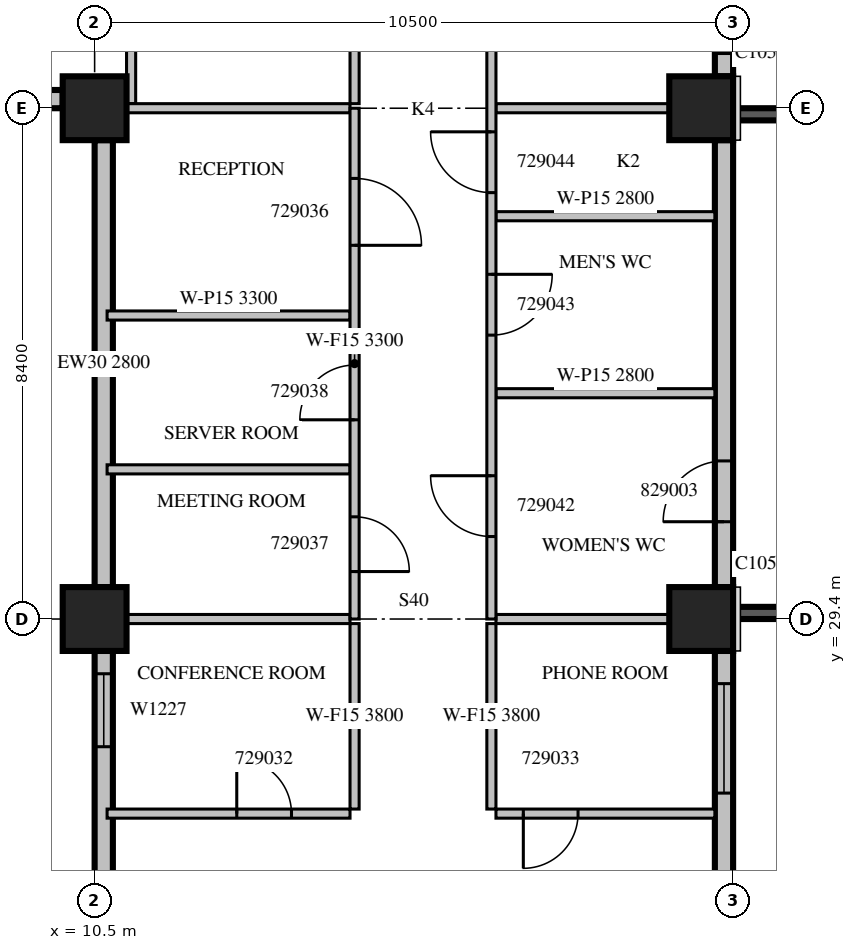
"""IFC4 building model, lengths in metres.
Left out: names, types, materials, properties, quantities, classifications, styles, units other than length and angle.
Written with IfcOpenShell. Run it as: python <this file> out.ifc"""

import sys

from ifc_helpers import new_model, si_unit, direction, frame, frame_2d, origin, origin_2d, place, context, subcontext, project, spatial, rectangle, extrude, source, transform, mapped, element, fill, save


model = new_model("IFC4")
c1 = context("Model", 3, precision=1e-05, world=origin(), true_north=direction((0.0, 1.0)))
c2 = subcontext(c1, "Body", "Model", "MODEL_VIEW")
j1 = project(units=[si_unit("LENGTHUNIT", "METRE"), si_unit("PLANEANGLEUNIT", "RADIAN")], contexts=[c1])
p1 = place(None, origin())
s1 = spatial("IfcSite", under=j1, at=p1, CompositionType="ELEMENT")
p2 = place(p1, origin())
s2 = spatial("IfcBuilding", under=s1, at=p2, CompositionType="ELEMENT")
p3 = place(p2, frame((0.0, 0.0, 132.9)))
s3 = spatial("IfcBuildingStorey", under=s2, at=p3, CompositionType="ELEMENT", Elevation=132.9)
m1 = source(origin(), c2, "Body", "SweptSolid", [
    extrude(rectangle(XDim=1.05, YDim=1.05, at=origin_2d()), origin(), (0.0, 0.0, 1.0), 4.2),
])
for number, where, z_axis, x_axis in (
    (1, (10.5, 29.4, 0.0), (0.0, 0.0, 1.0), (1.0, 0.0, 0.0)),
    (2, (20.475, 29.4, 0.0), (0.0, 0.0, 1.0), (1.0, 0.0, 0.0)),
    (3, (10.5, 37.8, 0.0), (0.0, 0.0, 1.0), (1.0, 0.0, 0.0)),
    (4, (20.475, 37.8, 0.0), (0.0, 0.0, 1.0), (1.0, 0.0, 0.0)),
):
    element("IfcColumn", number, at=place(p3, frame(where, z_axis=z_axis, x_axis=x_axis)), inside=s3, PredefinedType="COLUMN", context=c2, shape_type="MappedRepresentation", body=[
        mapped(m1, transform((0.0, 0.0, 0.0), scale=1.0)),
    ])
m2 = source(origin(), c2, "Body", "SweptSolid", [
    extrude(rectangle(XDim=6.875, YDim=0.3, at=frame_2d((3.438, 0.0))), origin(), (0.0, 0.0, 1.0), 3.8),
])
p4 = place(p3, frame((20.85, 22.0, 0.0), z_axis=(0.0, 0.0, 1.0), x_axis=(0.0, 1.0, 0.0)))
e5 = element("IfcWall", 5, at=p4, inside=s3, PredefinedType="STANDARD", context=c2, shape_type="MappedRepresentation", body=[
    mapped(m2, transform((0.0, 0.0, 0.0), scale=1.0)),
])
m3 = source(origin(), c2, "Body", "SweptSolid", [
    extrude(rectangle(XDim=1.8, YDim=2.7, at=frame_2d((0.9, 1.35))), frame((0.0, 0.16, 0.0), z_axis=(0.0, -1.0, 0.0), x_axis=(1.0, 0.0, 0.0)), (0.0, 0.0, 1.0), 0.32),
])
p5 = place(p4, frame((0.2, 0.0, 0.6)))
e6 = element("IfcOpeningElement", 6, at=p5, cuts=e5, PredefinedType="OPENING", context=c2, shape_type="MappedRepresentation", body=[
    mapped(m3, transform((0.0, 0.0, 0.0), scale=1.0)),
])
p6 = place(p4, frame((4.537, 0.0, 0.6)))
e7 = element("IfcOpeningElement", 7, at=p6, cuts=e5, PredefinedType="OPENING", context=c2, shape_type="MappedRepresentation", body=[
    mapped(m3, transform((0.0, 0.0, 0.0), scale=1.0)),
])
m4 = source(origin(), c2, "Body", "SweptSolid", [
    extrude(rectangle(XDim=7.35, YDim=0.3, at=frame_2d((3.675, 0.0))), origin(), (0.0, 0.0, 1.0), 3.8),
])
p7 = place(p3, frame((20.85, 29.925, 0.0), z_axis=(0.0, 0.0, 1.0), x_axis=(0.0, 1.0, 0.0)))
e8 = element("IfcWall", 8, at=p7, inside=s3, PredefinedType="STANDARD", context=c2, shape_type="MappedRepresentation", body=[
    mapped(m4, transform((0.0, 0.0, 0.0), scale=1.0)),
])
m5 = source(origin(), c2, "Body", "SweptSolid", [
    extrude(rectangle(XDim=1.0, YDim=2.1, at=frame_2d((0.5, 1.05))), frame((0.0, 0.16, 0.0), z_axis=(0.0, -1.0, 0.0), x_axis=(1.0, 0.0, 0.0)), (0.0, 0.0, 1.0), 0.32),
])
p8 = place(p7, frame((1.075, 0.0, 0.0)))
e9 = element("IfcOpeningElement", 9, at=p8, cuts=e8, PredefinedType="OPENING", context=c2, shape_type="MappedRepresentation", body=[
    mapped(m5, transform((0.0, 0.0, 0.0), scale=1.0)),
])
p9 = place(p3, frame((20.85, 38.325, 0.0), z_axis=(0.0, 0.0, 1.0), x_axis=(0.0, 1.0, 0.0)))
e10 = element("IfcWall", 10, at=p9, inside=s3, PredefinedType="STANDARD", context=c2, shape_type="MappedRepresentation", body=[
    mapped(m4, transform((0.0, 0.0, 0.0), scale=1.0)),
])
m6 = source(origin(), c2, "Body", "SweptSolid", [
    extrude(rectangle(XDim=2.4, YDim=2.7, at=frame_2d((1.2, 1.35))), frame((0.0, 0.16, 0.0), z_axis=(0.0, -1.0, 0.0), x_axis=(1.0, 0.0, 0.0)), (0.0, 0.0, 1.0), 0.32),
])
p10 = place(p9, frame((0.375, 0.0, 0.6)))
e11 = element("IfcOpeningElement", 11, at=p10, cuts=e10, PredefinedType="OPENING", context=c2, shape_type="MappedRepresentation", body=[
    mapped(m6, transform((0.0, 0.0, 0.0), scale=1.0)),
])
p11 = place(p9, frame((4.575, 0.0, 0.6)))
e12 = element("IfcOpeningElement", 12, at=p11, cuts=e10, PredefinedType="OPENING", context=c2, shape_type="MappedRepresentation", body=[
    mapped(m6, transform((0.0, 0.0, 0.0), scale=1.0)),
])
m7 = source(origin(), c2, "Body", "SweptSolid", [
    extrude(rectangle(XDim=1.275, YDim=0.3, at=frame_2d((0.637, 0.0))), origin(), (0.0, 0.0, 1.0), 3.8),
])
p12 = place(p3, frame((8.7, 37.95, 0.0), z_axis=(0.0, 0.0, 1.0), x_axis=(1.0, 0.0, 0.0)))
e13 = element("IfcWall", 13, at=p12, inside=s3, PredefinedType="STANDARD", context=c2, shape_type="MappedRepresentation", body=[
    mapped(m7, transform((0.0, 0.0, 0.0), scale=1.0)),
])
m8 = source(origin(), c2, "Body", "SweptSolid", [
    extrude(rectangle(XDim=7.35, YDim=0.3, at=frame_2d((3.675, 0.0))), origin(), (0.0, 0.0, 1.0), 2.8),
])
p13 = place(p3, frame((10.65, 37.275, 0.0), z_axis=(0.0, 0.0, 1.0), x_axis=(0.0, -1.0, 0.0)))
e14 = element("IfcWall", 14, at=p13, inside=s3, PredefinedType="STANDARD", context=c2, shape_type="MappedRepresentation", body=[
    mapped(m8, transform((0.0, 0.0, 0.0), scale=1.0)),
])
p14 = place(p3, frame((10.65, 28.875, 0.0), z_axis=(0.0, 0.0, 1.0), x_axis=(0.0, -1.0, 0.0)))
e15 = element("IfcWall", 15, at=p14, inside=s3, PredefinedType="STANDARD", context=c2, shape_type="MappedRepresentation", body=[
    mapped(m2, transform((0.0, 0.0, 0.0), scale=1.0)),
])
m9 = source(origin(), c2, "Body", "SweptSolid", [
    extrude(rectangle(XDim=1.2, YDim=2.7, at=frame_2d((0.6, 1.35))), frame((0.0, 0.16, 0.0), z_axis=(0.0, -1.0, 0.0), x_axis=(1.0, 0.0, 0.0)), (0.0, 0.0, 1.0), 0.32),
])
p15 = place(p14, frame((0.375, 0.0, 0.6)))
e16 = element("IfcOpeningElement", 16, at=p15, cuts=e15, PredefinedType="OPENING", context=c2, shape_type="MappedRepresentation", body=[
    mapped(m9, transform((0.0, 0.0, 0.0), scale=1.0)),
])
m10 = source(origin(), c2, "Body", "SweptSolid", [
    extrude(rectangle(XDim=3.0, YDim=2.7, at=frame_2d((1.5, 1.35))), frame((0.0, 0.16, 0.0), z_axis=(0.0, -1.0, 0.0), x_axis=(1.0, 0.0, 0.0)), (0.0, 0.0, 1.0), 0.32),
])
p16 = place(p14, frame((3.675, 0.0, 0.6)))
e17 = element("IfcOpeningElement", 17, at=p16, cuts=e15, PredefinedType="OPENING", context=c2, shape_type="MappedRepresentation", body=[
    mapped(m10, transform((0.0, 0.0, 0.0), scale=1.0)),
])
m11 = source(origin(), c2, "Body", "SweptSolid", [
    extrude(rectangle(XDim=3.9, YDim=0.2, at=frame_2d((1.95, 0.0))), origin(), (0.0, 0.0, 1.0), 3.79),
])
p17 = place(p3, frame((21.0, 29.5, 0.0), z_axis=(0.0, 0.0, 1.0), x_axis=(1.0, 0.0, 0.0)))
e18 = element("IfcWall", 18, at=p17, inside=s3, PredefinedType="SOLIDWALL", context=c2, shape_type="MappedRepresentation", body=[
    mapped(m11, transform((0.0, 0.0, 0.0), scale=1.0)),
])
m12 = source(origin(), c2, "Body", "SweptSolid", [
    extrude(rectangle(XDim=2.4, YDim=2.7, at=frame_2d((1.2, 1.35))), frame((0.0, 0.11, 0.0), z_axis=(0.0, -1.0, 0.0), x_axis=(1.0, 0.0, 0.0)), (0.0, 0.0, 1.0), 0.22),
])
p18 = place(p17, frame((0.75, 0.0, 0.6)))
e19 = element("IfcOpeningElement", 19, at=p18, cuts=e18, PredefinedType="OPENING", context=c2, shape_type="MappedRepresentation", body=[
    mapped(m12, transform((0.0, 0.0, 0.0), scale=1.0)),
])
p19 = place(p3, frame((21.0, 37.7, 0.0), z_axis=(0.0, 0.0, 1.0), x_axis=(1.0, 0.0, 0.0)))
e20 = element("IfcWall", 20, at=p19, inside=s3, PredefinedType="SOLIDWALL", context=c2, shape_type="MappedRepresentation", body=[
    mapped(m11, transform((0.0, 0.0, 0.0), scale=1.0)),
])
p20 = place(p19, frame((0.75, 0.0, 0.6)))
e21 = element("IfcOpeningElement", 21, at=p20, cuts=e20, PredefinedType="OPENING", context=c2, shape_type="MappedRepresentation", body=[
    mapped(m12, transform((0.0, 0.0, 0.0), scale=1.0)),
])
m13 = source(origin(), c2, "Body", "SweptSolid", [
    extrude(rectangle(XDim=3.995, YDim=0.15, at=frame_2d((1.998, 0.0))), origin(), (0.0, 0.0, 1.0), 3.8),
])
p21 = place(p3, frame((10.705, 26.2, 0.0), z_axis=(0.0, 0.0, 1.0), x_axis=(1.0, 0.0, 0.0)))
e22 = element("IfcWall", 22, at=p21, inside=s3, PredefinedType="PARTITIONING", context=c2, shape_type="MappedRepresentation", body=[
    mapped(m13, transform((0.0, 0.0, 0.0), scale=1.0)),
])
m14 = source(origin(), c2, "Body", "SweptSolid", [
    extrude(rectangle(XDim=0.9, YDim=2.1, at=frame_2d((0.45, 1.05))), frame((0.0, 0.085, 0.0), z_axis=(0.0, -1.0, 0.0), x_axis=(1.0, 0.0, 0.0)), (0.0, 0.0, 1.0), 0.17),
])
p22 = place(p21, frame((2.132, 0.0, 0.0)))
e23 = element("IfcOpeningElement", 23, at=p22, cuts=e22, PredefinedType="OPENING", context=c2, shape_type="MappedRepresentation", body=[
    mapped(m14, transform((0.0, 0.0, 0.0), scale=1.0)),
])
m15 = source(origin(), c2, "Body", "SweptSolid", [
    extrude(rectangle(XDim=3.6, YDim=0.15, at=frame_2d((1.8, 0.0))), origin(), (0.0, 0.0, 1.0), 3.8),
])
p23 = place(p3, frame((17.1, 26.2, 0.0), z_axis=(0.0, 0.0, 1.0), x_axis=(1.0, 0.0, 0.0)))
e24 = element("IfcWall", 24, at=p23, inside=s3, PredefinedType="PARTITIONING", context=c2, shape_type="MappedRepresentation", body=[
    mapped(m15, transform((0.0, 0.0, 0.0), scale=1.0)),
])
p24 = place(p23, frame((0.45, 0.0, 0.0)))
e25 = element("IfcOpeningElement", 25, at=p24, cuts=e24, PredefinedType="OPENING", context=c2, shape_type="MappedRepresentation", body=[
    mapped(m14, transform((0.0, 0.0, 0.0), scale=1.0)),
])
m16 = source(origin(), c2, "Body", "SweptSolid", [
    extrude(rectangle(XDim=3.05, YDim=0.15, at=frame_2d((1.525, 0.0))), origin(), (0.0, 0.0, 1.0), 3.8),
])
for number, where, z_axis, x_axis in (
    (26, (14.775, 26.275, 0.0), (0.0, 0.0, 1.0), (0.0, 1.0, 0.0)),
    (27, (17.025, 29.325, 0.0), (0.0, 0.0, 1.0), (0.0, -1.0, 0.0)),
):
    element("IfcWall", number, at=place(p3, frame(where, z_axis=z_axis, x_axis=x_axis)), inside=s3, PredefinedType="PARTITIONING", context=c2, shape_type="MappedRepresentation", body=[
        mapped(m16, transform((0.0, 0.0, 0.0), scale=1.0)),
    ])
m17 = source(origin(), c2, "Body", "SweptSolid", [
    extrude(rectangle(XDim=3.676, YDim=0.15, at=frame_2d((1.838, 0.0))), origin(), (0.0, 0.0, 1.0), 3.8),
])
p25 = place(p3, frame((14.7, 29.4, 0.0), z_axis=(0.0, 0.0, 1.0), x_axis=(-1.0, 0.0, 0.0)))
e28 = element("IfcWall", 28, at=p25, inside=s3, PredefinedType="PARTITIONING", context=c2, shape_type="MappedRepresentation", body=[
    mapped(m17, transform((0.0, 0.0, 0.0), scale=1.0)),
])
m18 = source(origin(), c2, "Body", "SweptSolid", [
    extrude(rectangle(XDim=2.851, YDim=0.15, at=frame_2d((1.425, 0.0))), origin(), (0.0, 0.0, 1.0), 3.8),
])
p26 = place(p3, frame((19.951, 29.4, 0.0), z_axis=(0.0, 0.0, 1.0), x_axis=(-1.0, 0.0, 0.0)))
e29 = element("IfcWall", 29, at=p26, inside=s3, PredefinedType="PARTITIONING", context=c2, shape_type="MappedRepresentation", body=[
    mapped(m18, transform((0.0, 0.0, 0.0), scale=1.0)),
])
m19 = source(origin(), c2, "Body", "SweptSolid", [
    extrude(rectangle(XDim=6.45, YDim=0.15, at=frame_2d((3.225, 0.0))), origin(), (0.0, 0.0, 1.0), 3.8),
])
p27 = place(p3, frame((11.1, 44.325, 0.0), z_axis=(0.0, 0.0, 1.0), x_axis=(0.0, -1.0, 0.0)))
e30 = element("IfcWall", 30, at=p27, inside=s3, PredefinedType="PARTITIONING", context=c2, shape_type="MappedRepresentation", body=[
    mapped(m19, transform((0.0, 0.0, 0.0), scale=1.0)),
])
p28 = place(p3, frame((14.775, 37.875, 0.0), z_axis=(0.0, 0.0, 1.0), x_axis=(0.0, 1.0, 0.0)))
e31 = element("IfcWall", 31, at=p28, inside=s3, PredefinedType="PARTITIONING", context=c2, shape_type="MappedRepresentation", body=[
    mapped(m19, transform((0.0, 0.0, 0.0), scale=1.0)),
])
p29 = place(p28, frame((2.737, 0.0, 0.0)))
e32 = element("IfcOpeningElement", 32, at=p29, cuts=e31, PredefinedType="OPENING", context=c2, shape_type="MappedRepresentation", body=[
    mapped(m14, transform((0.0, 0.0, 0.0), scale=1.0)),
])
p30 = place(p3, frame((14.7, 31.861, 0.0), z_axis=(0.0, 0.0, 1.0), x_axis=(-1.0, 0.0, 0.0)))
e33 = element("IfcWall", 33, at=p30, inside=s3, PredefinedType="PARTITIONING", context=c2, shape_type="MappedRepresentation", body=[
    mapped(m13, transform((0.0, 0.0, 0.0), scale=1.0)),
])
p31 = place(p3, frame((14.7, 34.391, 0.0), z_axis=(0.0, 0.0, 1.0), x_axis=(-1.0, 0.0, 0.0)))
e34 = element("IfcWall", 34, at=p31, inside=s3, PredefinedType="PARTITIONING", context=c2, shape_type="SweptSolid", body=[
    extrude(rectangle(XDim=3.995, YDim=0.15, at=frame_2d((1.998, 0.0))), origin(), (0.0, 0.0, 1.0), 3.3),
])
p32 = place(p3, frame((14.7, 37.8, 0.0), z_axis=(0.0, 0.0, 1.0), x_axis=(-1.0, 0.0, 0.0)))
e35 = element("IfcWall", 35, at=p32, inside=s3, PredefinedType="PARTITIONING", context=c2, shape_type="MappedRepresentation", body=[
    mapped(m17, transform((0.0, 0.0, 0.0), scale=1.0)),
])
m20 = source(origin(), c2, "Body", "SweptSolid", [
    extrude(rectangle(XDim=3.6, YDim=0.15, at=frame_2d((1.8, 0.0))), origin(), (0.0, 0.0, 1.0), 2.8),
])
for number, where, z_axis, x_axis in (
    (36, (17.1, 33.113, 0.0), (0.0, 0.0, 1.0), (1.0, 0.0, 0.0)),
    (37, (17.1, 36.024, 0.0), (0.0, 0.0, 1.0), (1.0, 0.0, 0.0)),
):
    element("IfcWall", number, at=place(p3, frame(where, z_axis=z_axis, x_axis=x_axis)), inside=s3, PredefinedType="PARTITIONING", context=c2, shape_type="MappedRepresentation", body=[
        mapped(m20, transform((0.0, 0.0, 0.0), scale=1.0)),
    ])
p33 = place(p3, frame((19.951, 37.8, 0.0), z_axis=(0.0, 0.0, 1.0), x_axis=(-1.0, 0.0, 0.0)))
e38 = element("IfcWall", 38, at=p33, inside=s3, PredefinedType="PARTITIONING", context=c2, shape_type="MappedRepresentation", body=[
    mapped(m18, transform((0.0, 0.0, 0.0), scale=1.0)),
])
m21 = source(origin(), c2, "Body", "SweptSolid", [
    extrude(rectangle(XDim=8.4, YDim=0.15, at=frame_2d((4.2, 0.0))), origin(), (0.0, 0.0, 1.0), 3.3),
])
p34 = place(p3, frame((14.775, 29.4, 0.0), z_axis=(0.0, 0.0, 1.0), x_axis=(0.0, 1.0, 0.0)))
e39 = element("IfcWall", 39, at=p34, inside=s3, PredefinedType="PARTITIONING", context=c2, shape_type="MappedRepresentation", body=[
    mapped(m21, transform((0.0, 0.0, 0.0), scale=1.0)),
])
m22 = source(origin(), c2, "Body", "SweptSolid", [
    extrude(rectangle(XDim=1.1, YDim=2.1, at=frame_2d((0.55, 1.05))), frame((0.0, 0.085, 0.0), z_axis=(0.0, -1.0, 0.0), x_axis=(1.0, 0.0, 0.0)), (0.0, 0.0, 1.0), 0.17),
])
p35 = place(p34, frame((6.146, 0.0, 0.0)))
e40 = element("IfcOpeningElement", 40, at=p35, cuts=e39, PredefinedType="OPENING", context=c2, shape_type="MappedRepresentation", body=[
    mapped(m22, transform((0.0, 0.0, 0.0), scale=1.0)),
])
p36 = place(p34, frame((0.781, 0.0, 0.0)))
e41 = element("IfcOpeningElement", 41, at=p36, cuts=e39, PredefinedType="OPENING", context=c2, shape_type="MappedRepresentation", body=[
    mapped(m14, transform((0.0, 0.0, 0.0), scale=1.0)),
])
p37 = place(p34, frame((3.276, 0.0, 0.0)))
e42 = element("IfcOpeningElement", 42, at=p37, cuts=e39, PredefinedType="OPENING", context=c2, shape_type="MappedRepresentation", body=[
    mapped(m14, transform((0.0, 0.0, 0.0), scale=1.0)),
])
m23 = source(origin(), c2, "Body", "SweptSolid", [
    extrude(rectangle(XDim=19.86, YDim=0.15, at=frame_2d((9.93, 0.0))), origin(), (0.0, 0.0, 1.0), 3.3),
])
p38 = place(p3, frame((17.025, 49.26, 0.0), z_axis=(0.0, 0.0, 1.0), x_axis=(0.0, -1.0, 0.0)))
e43 = element("IfcWall", 43, at=p38, inside=s3, PredefinedType="PARTITIONING", context=c2, shape_type="MappedRepresentation", body=[
    mapped(m23, transform((0.0, 0.0, 0.0), scale=1.0)),
])
m24 = source(origin(), c2, "Body", "SweptSolid", [
    extrude(rectangle(XDim=1.0, YDim=2.1, at=frame_2d((0.5, 1.05))), frame((0.0, 0.085, 0.0), z_axis=(0.0, -1.0, 0.0), x_axis=(1.0, 0.0, 0.0)), (0.0, 0.0, 1.0), 0.17),
])
p39 = place(p38, frame((17.503, 0.0, 0.0)))
e44 = element("IfcOpeningElement", 44, at=p39, cuts=e43, PredefinedType="OPENING", context=c2, shape_type="MappedRepresentation", body=[
    mapped(m24, transform((0.0, 0.0, 0.0), scale=1.0)),
])
p40 = place(p38, frame((14.191, 0.0, 0.0)))
e45 = element("IfcOpeningElement", 45, at=p40, cuts=e43, PredefinedType="OPENING", context=c2, shape_type="MappedRepresentation", body=[
    mapped(m24, transform((0.0, 0.0, 0.0), scale=1.0)),
])
p41 = place(p38, frame((11.848, 0.0, 0.0)))
e46 = element("IfcOpeningElement", 46, at=p41, cuts=e43, PredefinedType="OPENING", context=c2, shape_type="MappedRepresentation", body=[
    mapped(m24, transform((0.0, 0.0, 0.0), scale=1.0)),
])
p42 = place(p38, frame((8.91, 0.0, 0.0)))
e47 = element("IfcOpeningElement", 47, at=p42, cuts=e43, PredefinedType="OPENING", context=c2, shape_type="MappedRepresentation", body=[
    mapped(m14, transform((0.0, 0.0, 0.0), scale=1.0)),
])
p43 = place(p38, frame((4.976, 0.0, 0.0)))
e48 = element("IfcOpeningElement", 48, at=p43, cuts=e43, PredefinedType="OPENING", context=c2, shape_type="MappedRepresentation", body=[
    mapped(m14, transform((0.0, 0.0, 0.0), scale=1.0)),
])
p44 = place(p38, frame((1.309, 0.0, 0.0)))
e49 = element("IfcOpeningElement", 49, at=p44, cuts=e43, PredefinedType="OPENING", context=c2, shape_type="MappedRepresentation", body=[
    mapped(m14, transform((0.0, 0.0, 0.0), scale=1.0)),
])
m25 = source(origin(), c2, "Body", "SweptSolid", [
    extrude(rectangle(XDim=1.8, YDim=2.7, at=frame_2d((0.9, 1.35))), frame((0.0, 0.03, 0.0), z_axis=(0.0, -1.0, 0.0), x_axis=(1.0, 0.0, 0.0)), (0.0, 0.0, 1.0), 0.06),
])
p45 = place(p6, origin())
e50 = element("IfcWindow", 50, at=p45, inside=s3, PartitioningType="SINGLE_PANEL", PredefinedType="WINDOW", context=c2, shape_type="MappedRepresentation", body=[
    mapped(m25, transform((0.0, 0.0, 0.0), scale=1.0)),
])
fill(e7, e50)
m26 = source(origin(), c2, "Body", "SweptSolid", [
    extrude(rectangle(XDim=2.4, YDim=2.7, at=frame_2d((1.2, 1.35))), frame((0.0, 0.03, 0.0), z_axis=(0.0, -1.0, 0.0), x_axis=(1.0, 0.0, 0.0)), (0.0, 0.0, 1.0), 0.06),
])
p46 = place(p10, origin())
e51 = element("IfcWindow", 51, at=p46, inside=s3, PartitioningType="SINGLE_PANEL", PredefinedType="WINDOW", context=c2, shape_type="MappedRepresentation", body=[
    mapped(m26, transform((0.0, 0.0, 0.0), scale=1.0)),
])
fill(e11, e51)
m27 = source(origin(), c2, "Body", "SweptSolid", [
    extrude(rectangle(XDim=1.2, YDim=2.7, at=frame_2d((0.6, 1.35))), frame((0.0, 0.03, 0.0), z_axis=(0.0, -1.0, 0.0), x_axis=(1.0, 0.0, 0.0)), (0.0, 0.0, 1.0), 0.06),
])
p47 = place(p15, origin())
e52 = element("IfcWindow", 52, at=p47, inside=s3, PartitioningType="SINGLE_PANEL", PredefinedType="WINDOW", context=c2, shape_type="MappedRepresentation", body=[
    mapped(m27, transform((0.0, 0.0, 0.0), scale=1.0)),
])
fill(e16, e52)
m28 = source(origin(), c2, "Body", "SweptSolid", [
    extrude(rectangle(XDim=0.9, YDim=2.1, at=frame_2d((0.45, 1.05))), frame((0.0, 0.025, 0.0), z_axis=(0.0, -1.0, 0.0), x_axis=(1.0, 0.0, 0.0)), (0.0, 0.0, 1.0), 0.05),
])
p48 = place(p22, origin())
e53 = element("IfcDoor", 53, at=p48, inside=s3, OperationType="SINGLE_SWING_LEFT", PredefinedType="DOOR", context=c2, shape_type="MappedRepresentation", body=[
    mapped(m28, transform((0.0, 0.0, 0.0), scale=1.0)),
])
fill(e23, e53)
p49 = place(p24, origin())
e54 = element("IfcDoor", 54, at=p49, inside=s3, OperationType="SINGLE_SWING_RIGHT", PredefinedType="DOOR", context=c2, shape_type="MappedRepresentation", body=[
    mapped(m28, transform((0.0, 0.0, 0.0), scale=1.0)),
])
fill(e25, e54)
m29 = source(origin(), c2, "Body", "SweptSolid", [
    extrude(rectangle(XDim=1.1, YDim=2.1, at=frame_2d((0.55, 1.05))), frame((0.0, 0.025, 0.0), z_axis=(0.0, -1.0, 0.0), x_axis=(1.0, 0.0, 0.0)), (0.0, 0.0, 1.0), 0.05),
])
p50 = place(p35, origin())
e55 = element("IfcDoor", 55, at=p50, inside=s3, OperationType="SINGLE_SWING_RIGHT", PredefinedType="DOOR", context=c2, shape_type="MappedRepresentation", body=[
    mapped(m29, transform((0.0, 0.0, 0.0), scale=1.0)),
])
fill(e40, e55)
p51 = place(p36, origin())
e56 = element("IfcDoor", 56, at=p51, inside=s3, OperationType="SINGLE_SWING_RIGHT", PredefinedType="DOOR", context=c2, shape_type="MappedRepresentation", body=[
    mapped(m28, transform((0.0, 0.0, 0.0), scale=1.0)),
])
fill(e41, e56)
p52 = place(p37, origin())
e57 = element("IfcDoor", 57, at=p52, inside=s3, OperationType="SINGLE_SWING_LEFT", PredefinedType="DOOR", context=c2, shape_type="MappedRepresentation", body=[
    mapped(m28, transform((0.0, 0.0, 0.0), scale=1.0)),
])
fill(e42, e57)
m30 = source(origin(), c2, "Body", "SweptSolid", [
    extrude(rectangle(XDim=1.0, YDim=2.1, at=frame_2d((0.5, 1.05))), frame((0.0, 0.025, 0.0), z_axis=(0.0, -1.0, 0.0), x_axis=(1.0, 0.0, 0.0)), (0.0, 0.0, 1.0), 0.05),
])
p53 = place(p39, origin())
e58 = element("IfcDoor", 58, at=p53, inside=s3, OperationType="SINGLE_SWING_RIGHT", PredefinedType="DOOR", context=c2, shape_type="MappedRepresentation", body=[
    mapped(m30, transform((0.0, 0.0, 0.0), scale=1.0)),
])
fill(e44, e58)
p54 = place(p40, origin())
e59 = element("IfcDoor", 59, at=p54, inside=s3, OperationType="SINGLE_SWING_LEFT", PredefinedType="DOOR", context=c2, shape_type="MappedRepresentation", body=[
    mapped(m30, transform((0.0, 0.0, 0.0), scale=1.0)),
])
fill(e45, e59)
p55 = place(p41, origin())
e60 = element("IfcDoor", 60, at=p55, inside=s3, OperationType="SINGLE_SWING_RIGHT", PredefinedType="DOOR", context=c2, shape_type="MappedRepresentation", body=[
    mapped(m30, transform((0.0, 0.0, 0.0), scale=1.0)),
])
fill(e46, e60)
p56 = place(p8, origin())
e61 = element("IfcDoor", 61, at=p56, inside=s3, OperationType="SINGLE_SWING_LEFT", PredefinedType="DOOR", context=c2, shape_type="MappedRepresentation", body=[
    mapped(m30, transform((0.0, 0.0, 0.0), scale=1.0)),
])
fill(e9, e61)
save(model, sys.argv[1])
